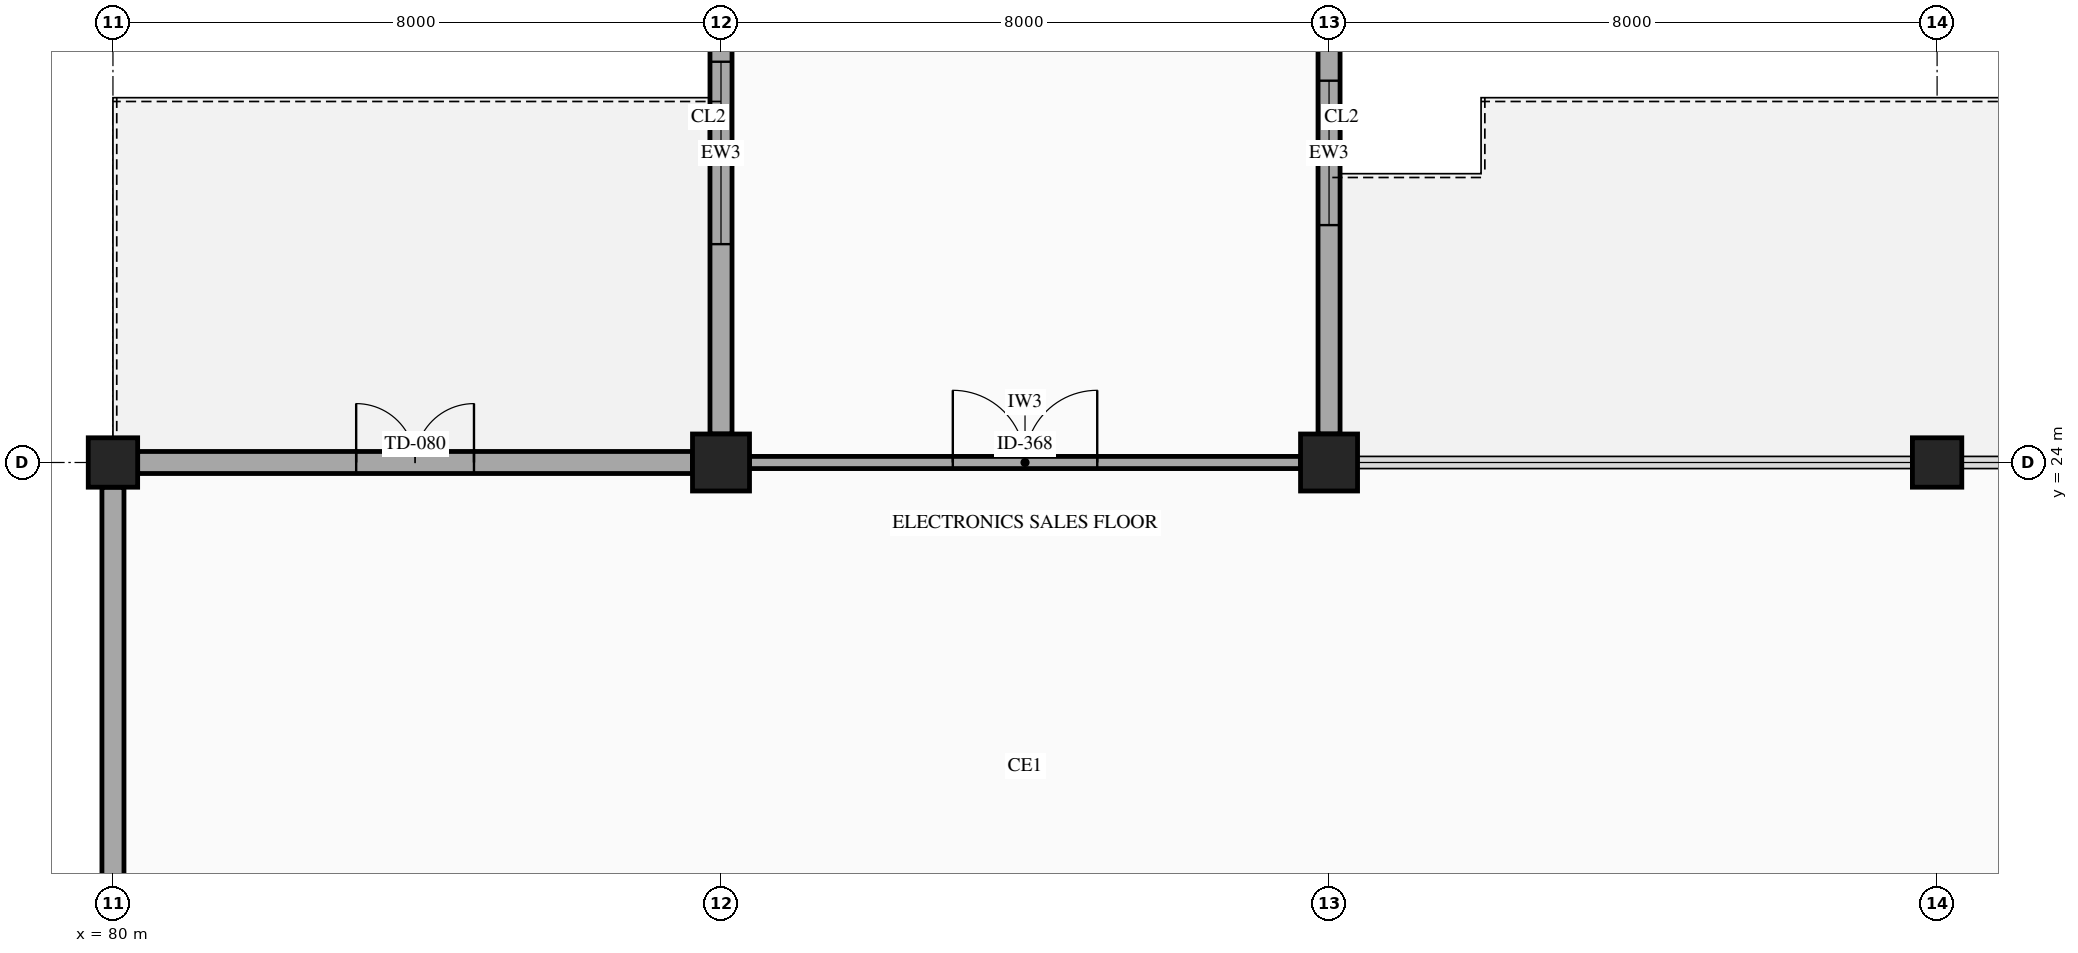
"""IFC4 building model, lengths in metres.
Left out: names, types, materials, properties, quantities, classifications, styles, units other than length and angle.
Written with IfcOpenShell. Run it as: python <this file> out.ifc"""

import sys

from ifc_helpers import new_model, si_unit, direction, frame, frame_2d, origin, origin_2d, place, context, subcontext, project, spatial, rectangle, extrude, element, fill, save


model = new_model("IFC4")
c1 = context("Model", 3, precision=1e-05, world=origin(), true_north=direction((0.0, 1.0)))
c2 = subcontext(c1, "Body", "Model", "MODEL_VIEW")
j1 = project(units=[si_unit("LENGTHUNIT", "METRE"), si_unit("PLANEANGLEUNIT", "RADIAN")], contexts=[c1])
p1 = place(None, origin())
s1 = spatial("IfcSite", under=j1, at=p1, CompositionType="ELEMENT")
p2 = place(p1, origin())
s2 = spatial("IfcBuilding", under=s1, at=p2, CompositionType="ELEMENT")
p3 = place(p2, frame((0.0, 0.0, 23.9)))
s3 = spatial("IfcBuildingStorey", under=s2, at=p3, CompositionType="ELEMENT", Elevation=23.9)
p4 = place(p3, frame((80.0, 24.0, 0.0), z_axis=(0.0, 0.0, 1.0), x_axis=(1.0, 0.0, 0.0)))
e1 = element("IfcColumn", 1, at=p4, inside=s3, PredefinedType="COLUMN", context=c2, shape_type="SweptSolid", body=[
    extrude(rectangle(XDim=0.65, YDim=0.65, at=origin_2d()), origin(), (0.0, 0.0, 1.0), 4.5),
])
for number, where, z_axis, x_axis in (
    (2, (88.0, 24.0, 0.0), (0.0, 0.0, 1.0), (1.0, 0.0, 0.0)),
    (3, (96.0, 24.0, 0.0), (0.0, 0.0, 1.0), (1.0, 0.0, 0.0)),
):
    element("IfcColumn", number, at=place(p3, frame(where, z_axis=z_axis, x_axis=x_axis)), inside=s3, PredefinedType="COLUMN", context=c2, shape_type="SweptSolid", body=[
        extrude(rectangle(XDim=0.75, YDim=0.75, at=origin_2d()), origin(), (0.0, 0.0, 1.0), 4.5),
    ])
p5 = place(p3, frame((104.0, 24.0, 0.0), z_axis=(0.0, 0.0, 1.0), x_axis=(1.0, 0.0, 0.0)))
e4 = element("IfcColumn", 4, at=p5, inside=s3, PredefinedType="COLUMN", context=c2, shape_type="SweptSolid", body=[
    extrude(rectangle(XDim=0.65, YDim=0.65, at=origin_2d()), origin(), (0.0, 0.0, 1.0), 4.5),
])
p6 = place(p3, frame((88.0, 24.375, 0.0), z_axis=(0.0, 0.0, 1.0), x_axis=(0.0, 1.0, 0.0)))
e5 = element("IfcWall", 5, at=p6, inside=s3, PredefinedType="STANDARD", context=c2, shape_type="SweptSolid", body=[
    extrude(rectangle(XDim=7.396, YDim=0.29, at=frame_2d((3.698, 0.0))), origin(), (0.0, 0.0, 1.0), 3.48),
])
p7 = place(p6, frame((2.498, 0.0, 0.8)))
e6 = element("IfcOpeningElement", 6, at=p7, cuts=e5, PredefinedType="OPENING", context=c2, shape_type="SweptSolid", body=[
    extrude(rectangle(XDim=2.4, YDim=1.8, at=frame_2d((1.2, 0.9))), frame((0.0, 0.155, 0.0), z_axis=(0.0, -1.0, 0.0), x_axis=(1.0, 0.0, 0.0)), (0.0, 0.0, 1.0), 0.31),
])
p8 = place(p3, frame((96.0, 31.771, 0.0), z_axis=(0.0, 0.0, 1.0), x_axis=(0.0, -1.0, 0.0)))
e7 = element("IfcWall", 7, at=p8, inside=s3, PredefinedType="STANDARD", context=c2, shape_type="SweptSolid", body=[
    extrude(rectangle(XDim=7.396, YDim=0.29, at=frame_2d((3.698, 0.0))), origin(), (0.0, 0.0, 1.0), 3.48),
])
p9 = place(p8, frame((2.748, 0.0, 0.8)))
e8 = element("IfcOpeningElement", 8, at=p9, cuts=e7, PredefinedType="OPENING", context=c2, shape_type="SweptSolid", body=[
    extrude(rectangle(XDim=1.9, YDim=1.85, at=frame_2d((0.95, 0.925))), frame((0.0, 0.155, 0.0), z_axis=(0.0, -1.0, 0.0), x_axis=(1.0, 0.0, 0.0)), (0.0, 0.0, 1.0), 0.31),
])
p10 = place(p3, frame((80.0, 16.375, 0.0), z_axis=(0.0, 0.0, 1.0), x_axis=(0.0, 1.0, 0.0)))
e9 = element("IfcWall", 9, at=p10, inside=s3, PredefinedType="STANDARD", context=c2, shape_type="SweptSolid", body=[
    extrude(rectangle(XDim=7.3, YDim=0.29, at=frame_2d((3.65, 0.0))), origin(), (0.0, 0.0, 1.0), 3.48),
])
p11 = place(p3, frame((80.325, 24.0, 0.0), z_axis=(0.0, 0.0, 1.0), x_axis=(1.0, 0.0, 0.0)))
e10 = element("IfcWall", 10, at=p11, inside=s3, PredefinedType="STANDARD", context=c2, shape_type="SweptSolid", body=[
    extrude(rectangle(XDim=7.3, YDim=0.29, at=frame_2d((3.65, 0.0))), origin(), (0.0, 0.0, 1.0), 3.48),
])
p12 = place(p11, frame((2.875, 0.0, 0.0)))
e11 = element("IfcOpeningElement", 11, at=p12, cuts=e10, PredefinedType="OPENING", context=c2, shape_type="SweptSolid", body=[
    extrude(rectangle(XDim=1.55, YDim=2.15, at=frame_2d((0.775, 1.075))), frame((0.0, 0.155, 0.0), z_axis=(0.0, -1.0, 0.0), x_axis=(1.0, 0.0, 0.0)), (0.0, 0.0, 1.0), 0.31),
])
p13 = place(p3, frame((88.375, 24.0, 0.0), z_axis=(0.0, 0.0, 1.0), x_axis=(1.0, 0.0, 0.0)))
e12 = element("IfcWall", 12, at=p13, inside=s3, PredefinedType="PARTITIONING", context=c2, shape_type="SweptSolid", body=[
    extrude(rectangle(XDim=7.25, YDim=0.16, at=frame_2d((3.625, 0.0))), origin(), (0.0, 0.0, 1.0), 3.48),
])
p14 = place(p13, frame((2.675, 0.0, 0.0)))
e13 = element("IfcOpeningElement", 13, at=p14, cuts=e12, PredefinedType="OPENING", context=c2, shape_type="SweptSolid", body=[
    extrude(rectangle(XDim=1.9, YDim=2.3, at=frame_2d((0.95, 1.15))), frame((0.0, 0.09, 0.0), z_axis=(0.0, -1.0, 0.0), x_axis=(1.0, 0.0, 0.0)), (0.0, 0.0, 1.0), 0.18),
])
p15 = place(p7, origin())
e14 = element("IfcWindow", 14, at=p15, inside=s3, PartitioningType="DOUBLE_PANEL_VERTICAL", PredefinedType="WINDOW", context=c2, shape_type="SweptSolid", body=[
    extrude(rectangle(XDim=2.4, YDim=1.8, at=frame_2d((1.2, 0.9))), frame((0.0, 0.03, 0.0), z_axis=(0.0, -1.0, 0.0), x_axis=(1.0, 0.0, 0.0)), (0.0, 0.0, 1.0), 0.06),
])
fill(e6, e14)
p16 = place(p9, origin())
e15 = element("IfcWindow", 15, at=p16, inside=s3, PartitioningType="SINGLE_PANEL", PredefinedType="WINDOW", context=c2, shape_type="SweptSolid", body=[
    extrude(rectangle(XDim=1.9, YDim=1.85, at=frame_2d((0.95, 0.925))), frame((0.0, 0.03, 0.0), z_axis=(0.0, -1.0, 0.0), x_axis=(1.0, 0.0, 0.0)), (0.0, 0.0, 1.0), 0.06),
])
fill(e8, e15)
p17 = place(p12, origin())
e16 = element("IfcDoor", 16, at=p17, inside=s3, OperationType="DOUBLE_DOOR_SINGLE_SWING", PredefinedType="DOOR", context=c2, shape_type="SweptSolid", body=[
    extrude(rectangle(XDim=1.55, YDim=2.15, at=frame_2d((0.775, 1.075))), frame((0.0, 0.025, 0.0), z_axis=(0.0, -1.0, 0.0), x_axis=(1.0, 0.0, 0.0)), (0.0, 0.0, 1.0), 0.05),
])
fill(e11, e16)
p18 = place(p14, origin())
e17 = element("IfcDoor", 17, at=p18, inside=s3, OperationType="DOUBLE_DOOR_SINGLE_SWING", PredefinedType="DOOR", context=c2, shape_type="SweptSolid", body=[
    extrude(rectangle(XDim=1.9, YDim=2.3, at=frame_2d((0.95, 1.15))), frame((0.0, 0.025, 0.0), z_axis=(0.0, -1.0, 0.0), x_axis=(1.0, 0.0, 0.0)), (0.0, 0.0, 1.0), 0.05),
])
fill(e13, e17)
save(model, sys.argv[1])
